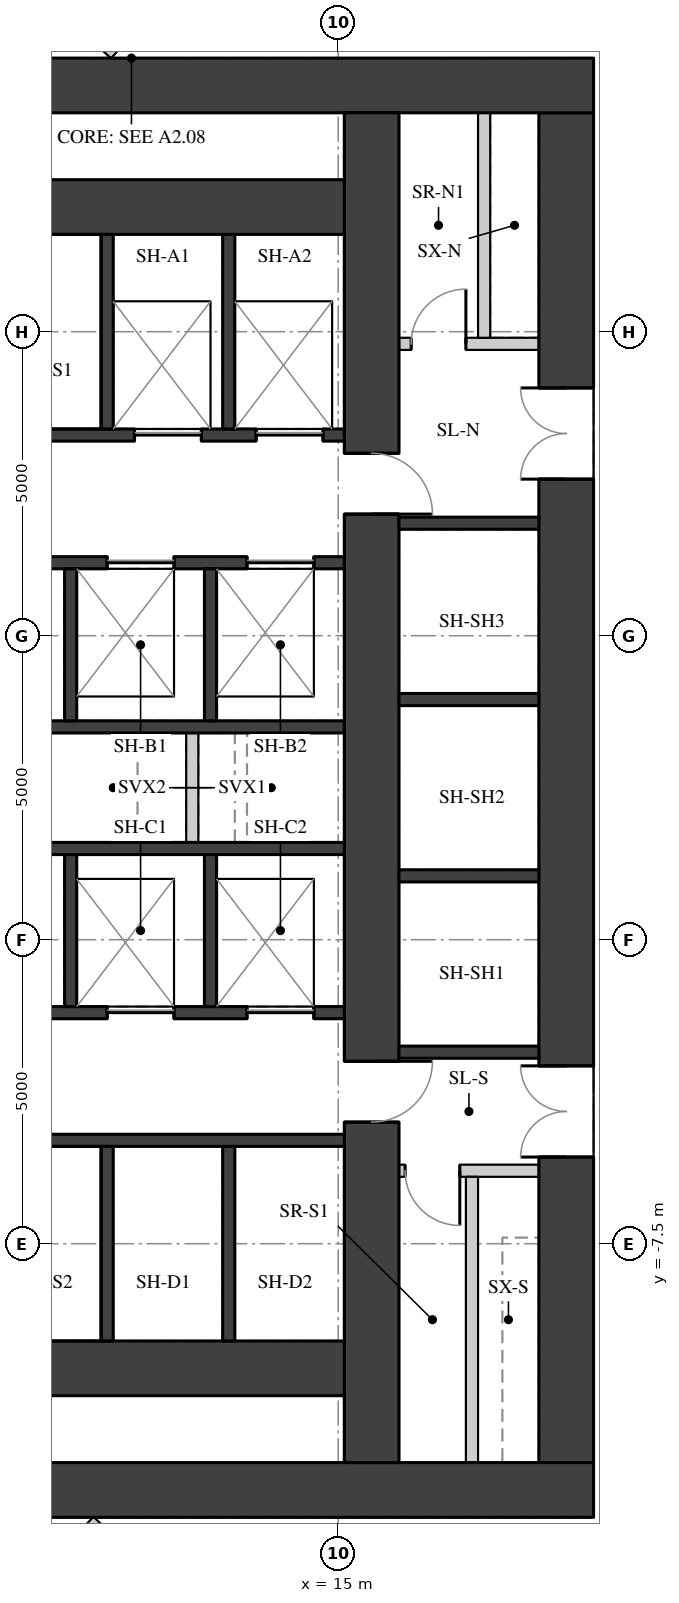
"""IFC4 building model, lengths in metres.
Left out: names, types, materials, properties, quantities, classifications, styles, units other than length and angle.
Written with IfcOpenShell. Run it as: python <this file> out.ifc"""

import sys

from ifc_helpers import new_model, si_unit, direction, frame, frame_2d, origin, place, context, subcontext, project, spatial, rectangle, extrude, element, fill, save


model = new_model("IFC4")
c1 = context("Model", 3, precision=1e-05, world=origin(), true_north=direction((0.0, 1.0)))
c2 = subcontext(c1, "Body", "Model", "MODEL_VIEW")
j1 = project(units=[si_unit("LENGTHUNIT", "METRE"), si_unit("PLANEANGLEUNIT", "RADIAN")], contexts=[c1])
p1 = place(None, origin())
s1 = spatial("IfcSite", under=j1, at=p1, CompositionType="ELEMENT")
p2 = place(p1, origin())
s2 = spatial("IfcBuilding", under=s1, at=p2, CompositionType="ELEMENT")
p3 = place(p2, frame((0.0, 0.0, 28.3)))
s3 = spatial("IfcBuildingStorey", under=s2, at=p3, CompositionType="ELEMENT", Elevation=28.3)
p4 = place(p3, frame((18.75, -11.1, 0.0), z_axis=(0.0, 0.0, 1.0), x_axis=(0.0, 1.0, 0.0)))
e1 = element("IfcWall", 1, at=p4, inside=s3, PredefinedType="SHEAR", context=c2, shape_type="SweptSolid", body=[
    extrude(rectangle(XDim=22.2, YDim=0.9, at=frame_2d((11.1, 0.0))), origin(), (0.0, 0.0, 1.0), 3.02),
])
p5 = place(p4, frame((16.175, 0.0, 0.0)))
e2 = element("IfcOpeningElement", 2, at=p5, cuts=e1, PredefinedType="OPENING", context=c2, shape_type="SweptSolid", body=[
    extrude(rectangle(XDim=1.5, YDim=2.1, at=frame_2d((0.75, 1.05))), frame((0.0, 0.46, 0.0), z_axis=(0.0, -1.0, 0.0), x_axis=(1.0, 0.0, 0.0)), (0.0, 0.0, 1.0), 0.92),
])
p6 = place(p4, frame((5.025, 0.0, 0.0)))
e3 = element("IfcOpeningElement", 3, at=p6, cuts=e1, PredefinedType="OPENING", context=c2, shape_type="SweptSolid", body=[
    extrude(rectangle(XDim=1.5, YDim=2.1, at=frame_2d((0.75, 1.05))), frame((0.0, 0.46, 0.0), z_axis=(0.0, -1.0, 0.0), x_axis=(1.0, 0.0, 0.0)), (0.0, 0.0, 1.0), 0.92),
])
for number, where, z_axis, x_axis in (
    (4, (4.0, 11.55, 0.0), (0.0, 0.0, 1.0), (1.0, 0.0, 0.0)),
    (5, (4.0, -11.55, 0.0), (0.0, 0.0, 1.0), (1.0, 0.0, 0.0)),
):
    element("IfcWall", number, at=place(p3, frame(where, z_axis=z_axis, x_axis=x_axis)), inside=s3, PredefinedType="SHEAR", context=c2, shape_type="SweptSolid", body=[
        extrude(rectangle(XDim=15.2, YDim=0.9, at=frame_2d((7.6, 0.0))), origin(), (0.0, 0.0, 1.0), 3.02),
    ])
p7 = place(p3, frame((15.55, -11.1, 0.0), z_axis=(0.0, 0.0, 1.0), x_axis=(0.0, 1.0, 0.0)))
e6 = element("IfcWall", 6, at=p7, inside=s3, PredefinedType="SHEAR", context=c2, shape_type="SweptSolid", body=[
    extrude(rectangle(XDim=22.2, YDim=0.9, at=frame_2d((11.1, 0.0))), origin(), (0.0, 0.0, 1.0), 3.02),
])
p8 = place(p7, frame((15.6, 0.0, 0.0)))
e7 = element("IfcOpeningElement", 7, at=p8, cuts=e6, PredefinedType="OPENING", context=c2, shape_type="SweptSolid", body=[
    extrude(rectangle(XDim=1.0, YDim=2.1, at=frame_2d((0.5, 1.05))), frame((0.0, 0.46, 0.0), z_axis=(0.0, -1.0, 0.0), x_axis=(1.0, 0.0, 0.0)), (0.0, 0.0, 1.0), 0.92),
])
p9 = place(p7, frame((5.6, 0.0, 0.0)))
e8 = element("IfcOpeningElement", 8, at=p9, cuts=e6, PredefinedType="OPENING", context=c2, shape_type="SweptSolid", body=[
    extrude(rectangle(XDim=1.0, YDim=2.1, at=frame_2d((0.5, 1.05))), frame((0.0, 0.46, 0.0), z_axis=(0.0, -1.0, 0.0), x_axis=(1.0, 0.0, 0.0)), (0.0, 0.0, 1.0), 0.92),
])
for number, where, z_axis, x_axis in (
    (9, (4.9, 9.55, 0.0), (0.0, 0.0, 1.0), (1.0, 0.0, 0.0)),
    (10, (4.9, -9.55, 0.0), (0.0, 0.0, 1.0), (1.0, 0.0, 0.0)),
):
    element("IfcWall", number, at=place(p3, frame(where, z_axis=z_axis, x_axis=x_axis)), inside=s3, PredefinedType="SHEAR", context=c2, shape_type="SweptSolid", body=[
        extrude(rectangle(XDim=10.2, YDim=0.9, at=frame_2d((5.1, 0.0))), origin(), (0.0, 0.0, 1.0), 3.02),
    ])
p10 = place(p3, frame((4.9, 5.8, 0.0), z_axis=(0.0, 0.0, 1.0), x_axis=(1.0, 0.0, 0.0)))
e11 = element("IfcWall", 11, at=p10, inside=s3, PredefinedType="SHEAR", context=c2, shape_type="SweptSolid", body=[
    extrude(rectangle(XDim=10.2, YDim=0.2, at=frame_2d((5.1, 0.0))), origin(), (0.0, 0.0, 1.0), 3.02),
])
p11 = place(p10, frame((6.75, 0.0, 0.0)))
e12 = element("IfcOpeningElement", 12, at=p11, cuts=e11, PredefinedType="OPENING", context=c2, shape_type="SweptSolid", body=[
    extrude(rectangle(XDim=1.1, YDim=2.1, at=frame_2d((0.55, 1.05))), frame((0.0, 0.11, 0.0), z_axis=(0.0, -1.0, 0.0), x_axis=(1.0, 0.0, 0.0)), (0.0, 0.0, 1.0), 0.22),
])
p12 = place(p10, frame((8.75, 0.0, 0.0)))
e13 = element("IfcOpeningElement", 13, at=p12, cuts=e11, PredefinedType="OPENING", context=c2, shape_type="SweptSolid", body=[
    extrude(rectangle(XDim=1.1, YDim=2.1, at=frame_2d((0.55, 1.05))), frame((0.0, 0.11, 0.0), z_axis=(0.0, -1.0, 0.0), x_axis=(1.0, 0.0, 0.0)), (0.0, 0.0, 1.0), 0.22),
])
p13 = place(p3, frame((4.9, 3.7, 0.0), z_axis=(0.0, 0.0, 1.0), x_axis=(1.0, 0.0, 0.0)))
e14 = element("IfcWall", 14, at=p13, inside=s3, PredefinedType="SHEAR", context=c2, shape_type="SweptSolid", body=[
    extrude(rectangle(XDim=10.2, YDim=0.2, at=frame_2d((5.1, 0.0))), origin(), (0.0, 0.0, 1.0), 3.02),
])
p14 = place(p13, frame((6.3, 0.0, 0.0)))
e15 = element("IfcOpeningElement", 15, at=p14, cuts=e14, PredefinedType="OPENING", context=c2, shape_type="SweptSolid", body=[
    extrude(rectangle(XDim=1.1, YDim=2.1, at=frame_2d((0.55, 1.05))), frame((0.0, 0.11, 0.0), z_axis=(0.0, -1.0, 0.0), x_axis=(1.0, 0.0, 0.0)), (0.0, 0.0, 1.0), 0.22),
])
p15 = place(p13, frame((8.6, 0.0, 0.0)))
e16 = element("IfcOpeningElement", 16, at=p15, cuts=e14, PredefinedType="OPENING", context=c2, shape_type="SweptSolid", body=[
    extrude(rectangle(XDim=1.1, YDim=2.1, at=frame_2d((0.55, 1.05))), frame((0.0, 0.11, 0.0), z_axis=(0.0, -1.0, 0.0), x_axis=(1.0, 0.0, 0.0)), (0.0, 0.0, 1.0), 0.22),
])
for number, where, z_axis, x_axis in (
    (17, (4.9, 1.0, 0.0), (0.0, 0.0, 1.0), (1.0, 0.0, 0.0)),
    (18, (4.9, -1.0, 0.0), (0.0, 0.0, 1.0), (1.0, 0.0, 0.0)),
):
    element("IfcWall", number, at=place(p3, frame(where, z_axis=z_axis, x_axis=x_axis)), inside=s3, PredefinedType="SHEAR", context=c2, shape_type="SweptSolid", body=[
        extrude(rectangle(XDim=10.2, YDim=0.2, at=frame_2d((5.1, 0.0))), origin(), (0.0, 0.0, 1.0), 3.02),
    ])
p16 = place(p3, frame((4.9, -3.7, 0.0), z_axis=(0.0, 0.0, 1.0), x_axis=(1.0, 0.0, 0.0)))
e19 = element("IfcWall", 19, at=p16, inside=s3, PredefinedType="SHEAR", context=c2, shape_type="SweptSolid", body=[
    extrude(rectangle(XDim=10.2, YDim=0.2, at=frame_2d((5.1, 0.0))), origin(), (0.0, 0.0, 1.0), 3.02),
])
p17 = place(p16, frame((6.3, 0.0, 0.0)))
e20 = element("IfcOpeningElement", 20, at=p17, cuts=e19, PredefinedType="OPENING", context=c2, shape_type="SweptSolid", body=[
    extrude(rectangle(XDim=1.1, YDim=2.1, at=frame_2d((0.55, 1.05))), frame((0.0, 0.11, 0.0), z_axis=(0.0, -1.0, 0.0), x_axis=(1.0, 0.0, 0.0)), (0.0, 0.0, 1.0), 0.22),
])
p18 = place(p16, frame((8.6, 0.0, 0.0)))
e21 = element("IfcOpeningElement", 21, at=p18, cuts=e19, PredefinedType="OPENING", context=c2, shape_type="SweptSolid", body=[
    extrude(rectangle(XDim=1.1, YDim=2.1, at=frame_2d((0.55, 1.05))), frame((0.0, 0.11, 0.0), z_axis=(0.0, -1.0, 0.0), x_axis=(1.0, 0.0, 0.0)), (0.0, 0.0, 1.0), 0.22),
])
p19 = place(p3, frame((4.9, -5.8, 0.0), z_axis=(0.0, 0.0, 1.0), x_axis=(1.0, 0.0, 0.0)))
e22 = element("IfcWall", 22, at=p19, inside=s3, PredefinedType="SHEAR", context=c2, shape_type="SweptSolid", body=[
    extrude(rectangle(XDim=10.2, YDim=0.2, at=frame_2d((5.1, 0.0))), origin(), (0.0, 0.0, 1.0), 3.02),
])
for number, where, z_axis, x_axis in (
    (23, (11.2, 5.9, 0.0), (0.0, 0.0, 1.0), (0.0, 1.0, 0.0)),
    (24, (11.2, -9.1, 0.0), (0.0, 0.0, 1.0), (0.0, 1.0, 0.0)),
    (25, (13.2, 5.9, 0.0), (0.0, 0.0, 1.0), (0.0, 1.0, 0.0)),
    (26, (13.2, -9.1, 0.0), (0.0, 0.0, 1.0), (0.0, 1.0, 0.0)),
):
    element("IfcWall", number, at=place(p3, frame(where, z_axis=z_axis, x_axis=x_axis)), inside=s3, PredefinedType="SHEAR", context=c2, shape_type="SweptSolid", body=[
        extrude(rectangle(XDim=3.2, YDim=0.2, at=frame_2d((1.6, 0.0))), origin(), (0.0, 0.0, 1.0), 3.02),
    ])
for number, where, z_axis, x_axis in (
    (27, (10.6, 1.1, 0.0), (0.0, 0.0, 1.0), (0.0, 1.0, 0.0)),
    (28, (10.6, -3.6, 0.0), (0.0, 0.0, 1.0), (0.0, 1.0, 0.0)),
    (29, (12.9, 1.1, 0.0), (0.0, 0.0, 1.0), (0.0, 1.0, 0.0)),
    (30, (12.9, -3.6, 0.0), (0.0, 0.0, 1.0), (0.0, 1.0, 0.0)),
):
    element("IfcWall", number, at=place(p3, frame(where, z_axis=z_axis, x_axis=x_axis)), inside=s3, PredefinedType="SHEAR", context=c2, shape_type="SweptSolid", body=[
        extrude(rectangle(XDim=2.5, YDim=0.2, at=frame_2d((1.25, 0.0))), origin(), (0.0, 0.0, 1.0), 3.02),
    ])
p20 = place(p3, frame((12.6, -0.9, 0.0), z_axis=(0.0, 0.0, 1.0), x_axis=(0.0, 1.0, 0.0)))
e31 = element("IfcWall", 31, at=p20, inside=s3, PredefinedType="PARTITIONING", context=c2, shape_type="SweptSolid", body=[
    extrude(rectangle(XDim=1.8, YDim=0.2, at=frame_2d((0.9, 0.0))), origin(), (0.0, 0.0, 1.0), 3.02),
])
for number, where, z_axis, x_axis in (
    (32, (16.0, -4.35, 0.0), (0.0, 0.0, 1.0), (1.0, 0.0, 0.0)),
    (33, (16.0, -1.45, 0.0), (0.0, 0.0, 1.0), (1.0, 0.0, 0.0)),
    (34, (16.0, 1.45, 0.0), (0.0, 0.0, 1.0), (1.0, 0.0, 0.0)),
    (35, (16.0, 4.35, 0.0), (0.0, 0.0, 1.0), (1.0, 0.0, 0.0)),
):
    element("IfcWall", number, at=place(p3, frame(where, z_axis=z_axis, x_axis=x_axis)), inside=s3, PredefinedType="SHEAR", context=c2, shape_type="SweptSolid", body=[
        extrude(rectangle(XDim=2.3, YDim=0.2, at=frame_2d((1.15, 0.0))), origin(), (0.0, 0.0, 1.0), 3.02),
    ])
p21 = place(p3, frame((16.0, 7.3, 0.0), z_axis=(0.0, 0.0, 1.0), x_axis=(1.0, 0.0, 0.0)))
e36 = element("IfcWall", 36, at=p21, inside=s3, PredefinedType="PARTITIONING", context=c2, shape_type="SweptSolid", body=[
    extrude(rectangle(XDim=2.3, YDim=0.2, at=frame_2d((1.15, 0.0))), origin(), (0.0, 0.0, 1.0), 3.02),
])
p22 = place(p21, frame((0.2, 0.0, 0.0)))
e37 = element("IfcOpeningElement", 37, at=p22, cuts=e36, PredefinedType="OPENING", context=c2, shape_type="SweptSolid", body=[
    extrude(rectangle(XDim=0.9, YDim=2.1, at=frame_2d((0.45, 1.05))), frame((0.0, 0.11, 0.0), z_axis=(0.0, -1.0, 0.0), x_axis=(1.0, 0.0, 0.0)), (0.0, 0.0, 1.0), 0.22),
])
p23 = place(p3, frame((17.4, 7.4, 0.0), z_axis=(0.0, 0.0, 1.0), x_axis=(0.0, 1.0, 0.0)))
e38 = element("IfcWall", 38, at=p23, inside=s3, PredefinedType="PARTITIONING", context=c2, shape_type="SweptSolid", body=[
    extrude(rectangle(XDim=3.7, YDim=0.2, at=frame_2d((1.85, 0.0))), origin(), (0.0, 0.0, 1.0), 3.02),
])
p24 = place(p3, frame((16.0, -6.3, 0.0), z_axis=(0.0, 0.0, 1.0), x_axis=(1.0, 0.0, 0.0)))
e39 = element("IfcWall", 39, at=p24, inside=s3, PredefinedType="PARTITIONING", context=c2, shape_type="SweptSolid", body=[
    extrude(rectangle(XDim=2.3, YDim=0.2, at=frame_2d((1.15, 0.0))), origin(), (0.0, 0.0, 1.0), 3.02),
])
p25 = place(p24, frame((0.1, 0.0, 0.0)))
e40 = element("IfcOpeningElement", 40, at=p25, cuts=e39, PredefinedType="OPENING", context=c2, shape_type="SweptSolid", body=[
    extrude(rectangle(XDim=0.9, YDim=2.1, at=frame_2d((0.45, 1.05))), frame((0.0, 0.11, 0.0), z_axis=(0.0, -1.0, 0.0), x_axis=(1.0, 0.0, 0.0)), (0.0, 0.0, 1.0), 0.22),
])
p26 = place(p3, frame((17.2, -11.1, 0.0), z_axis=(0.0, 0.0, 1.0), x_axis=(0.0, 1.0, 0.0)))
e41 = element("IfcWall", 41, at=p26, inside=s3, PredefinedType="PARTITIONING", context=c2, shape_type="SweptSolid", body=[
    extrude(rectangle(XDim=4.7, YDim=0.2, at=frame_2d((2.35, 0.0))), origin(), (0.0, 0.0, 1.0), 3.02),
])
p27 = place(p3, frame((9.813, 13.39, 0.0), z_axis=(0.0, 0.0, 1.0), x_axis=(0.746772740714, -0.665079298825, 0.0)))
e42 = element("IfcWall", 42, at=p27, inside=s3, PredefinedType="PARTITIONING", context=c2, shape_type="SweptSolid", body=[
    extrude(rectangle(XDim=2.011, YDim=0.15, at=frame_2d((1.006, 0.0))), origin(), (0.0, 0.0, 1.0), 3.02),
])
p28 = place(p3, frame((11.03, -12.043, 0.0), z_axis=(0.0, 0.0, 1.0), x_axis=(-0.687734044261, -0.725962729322, 0.0)))
e43 = element("IfcWall", 43, at=p28, inside=s3, PredefinedType="PARTITIONING", context=c2, shape_type="SweptSolid", body=[
    extrude(rectangle(XDim=1.916, YDim=0.15, at=frame_2d((0.958, 0.0))), origin(), (0.0, 0.0, 1.0), 3.02),
])
p29 = place(p5, origin())
e44 = element("IfcDoor", 44, at=p29, inside=s3, OperationType="DOUBLE_DOOR_SINGLE_SWING", PredefinedType="DOOR", context=c2, shape_type="SweptSolid", body=[
    extrude(rectangle(XDim=1.5, YDim=2.1, at=frame_2d((0.75, 1.05))), frame((0.0, 0.025, 0.0), z_axis=(0.0, -1.0, 0.0), x_axis=(1.0, 0.0, 0.0)), (0.0, 0.0, 1.0), 0.05),
])
fill(e2, e44)
p30 = place(p6, origin())
e45 = element("IfcDoor", 45, at=p30, inside=s3, OperationType="DOUBLE_DOOR_SINGLE_SWING", PredefinedType="DOOR", context=c2, shape_type="SweptSolid", body=[
    extrude(rectangle(XDim=1.5, YDim=2.1, at=frame_2d((0.75, 1.05))), frame((0.0, 0.025, 0.0), z_axis=(0.0, -1.0, 0.0), x_axis=(1.0, 0.0, 0.0)), (0.0, 0.0, 1.0), 0.05),
])
fill(e3, e45)
p31 = place(p11, origin())
e46 = element("IfcDoor", 46, at=p31, inside=s3, OperationType="DOUBLE_DOOR_SLIDING", PredefinedType="DOOR", context=c2, shape_type="SweptSolid", body=[
    extrude(rectangle(XDim=1.1, YDim=2.1, at=frame_2d((0.55, 1.05))), frame((0.0, 0.025, 0.0), z_axis=(0.0, -1.0, 0.0), x_axis=(1.0, 0.0, 0.0)), (0.0, 0.0, 1.0), 0.05),
])
fill(e12, e46)
p32 = place(p12, origin())
e47 = element("IfcDoor", 47, at=p32, inside=s3, OperationType="DOUBLE_DOOR_SLIDING", PredefinedType="DOOR", context=c2, shape_type="SweptSolid", body=[
    extrude(rectangle(XDim=1.1, YDim=2.1, at=frame_2d((0.55, 1.05))), frame((0.0, 0.025, 0.0), z_axis=(0.0, -1.0, 0.0), x_axis=(1.0, 0.0, 0.0)), (0.0, 0.0, 1.0), 0.05),
])
fill(e13, e47)
p33 = place(p14, origin())
e48 = element("IfcDoor", 48, at=p33, inside=s3, OperationType="DOUBLE_DOOR_SLIDING", PredefinedType="DOOR", context=c2, shape_type="SweptSolid", body=[
    extrude(rectangle(XDim=1.1, YDim=2.1, at=frame_2d((0.55, 1.05))), frame((0.0, 0.025, 0.0), z_axis=(0.0, -1.0, 0.0), x_axis=(1.0, 0.0, 0.0)), (0.0, 0.0, 1.0), 0.05),
])
fill(e15, e48)
p34 = place(p15, origin())
e49 = element("IfcDoor", 49, at=p34, inside=s3, OperationType="DOUBLE_DOOR_SLIDING", PredefinedType="DOOR", context=c2, shape_type="SweptSolid", body=[
    extrude(rectangle(XDim=1.1, YDim=2.1, at=frame_2d((0.55, 1.05))), frame((0.0, 0.025, 0.0), z_axis=(0.0, -1.0, 0.0), x_axis=(1.0, 0.0, 0.0)), (0.0, 0.0, 1.0), 0.05),
])
fill(e16, e49)
p35 = place(p17, origin())
e50 = element("IfcDoor", 50, at=p35, inside=s3, OperationType="DOUBLE_DOOR_SLIDING", PredefinedType="DOOR", context=c2, shape_type="SweptSolid", body=[
    extrude(rectangle(XDim=1.1, YDim=2.1, at=frame_2d((0.55, 1.05))), frame((0.0, 0.025, 0.0), z_axis=(0.0, -1.0, 0.0), x_axis=(1.0, 0.0, 0.0)), (0.0, 0.0, 1.0), 0.05),
])
fill(e20, e50)
p36 = place(p18, origin())
e51 = element("IfcDoor", 51, at=p36, inside=s3, OperationType="DOUBLE_DOOR_SLIDING", PredefinedType="DOOR", context=c2, shape_type="SweptSolid", body=[
    extrude(rectangle(XDim=1.1, YDim=2.1, at=frame_2d((0.55, 1.05))), frame((0.0, 0.025, 0.0), z_axis=(0.0, -1.0, 0.0), x_axis=(1.0, 0.0, 0.0)), (0.0, 0.0, 1.0), 0.05),
])
fill(e21, e51)
p37 = place(p8, origin())
e52 = element("IfcDoor", 52, at=p37, inside=s3, OperationType="SINGLE_SWING_RIGHT", PredefinedType="DOOR", context=c2, shape_type="SweptSolid", body=[
    extrude(rectangle(XDim=1.0, YDim=2.1, at=frame_2d((0.5, 1.05))), frame((0.0, 0.025, 0.0), z_axis=(0.0, -1.0, 0.0), x_axis=(1.0, 0.0, 0.0)), (0.0, 0.0, 1.0), 0.05),
])
fill(e7, e52)
p38 = place(p22, origin())
e53 = element("IfcDoor", 53, at=p38, inside=s3, OperationType="SINGLE_SWING_RIGHT", PredefinedType="DOOR", context=c2, shape_type="SweptSolid", body=[
    extrude(rectangle(XDim=0.9, YDim=2.1, at=frame_2d((0.45, 1.05))), frame((0.0, 0.025, 0.0), z_axis=(0.0, -1.0, 0.0), x_axis=(1.0, 0.0, 0.0)), (0.0, 0.0, 1.0), 0.05),
])
fill(e37, e53)
p39 = place(p9, origin())
e54 = element("IfcDoor", 54, at=p39, inside=s3, OperationType="SINGLE_SWING_LEFT", PredefinedType="DOOR", context=c2, shape_type="SweptSolid", body=[
    extrude(rectangle(XDim=1.0, YDim=2.1, at=frame_2d((0.5, 1.05))), frame((0.0, 0.025, 0.0), z_axis=(0.0, -1.0, 0.0), x_axis=(1.0, 0.0, 0.0)), (0.0, 0.0, 1.0), 0.05),
])
fill(e8, e54)
p40 = place(p25, origin())
e55 = element("IfcDoor", 55, at=p40, inside=s3, OperationType="SINGLE_SWING_LEFT", PredefinedType="DOOR", context=c2, shape_type="SweptSolid", body=[
    extrude(rectangle(XDim=0.9, YDim=2.1, at=frame_2d((0.45, 1.05))), frame((0.0, 0.025, 0.0), z_axis=(0.0, -1.0, 0.0), x_axis=(1.0, 0.0, 0.0)), (0.0, 0.0, 1.0), 0.05),
])
fill(e40, e55)
save(model, sys.argv[1])
